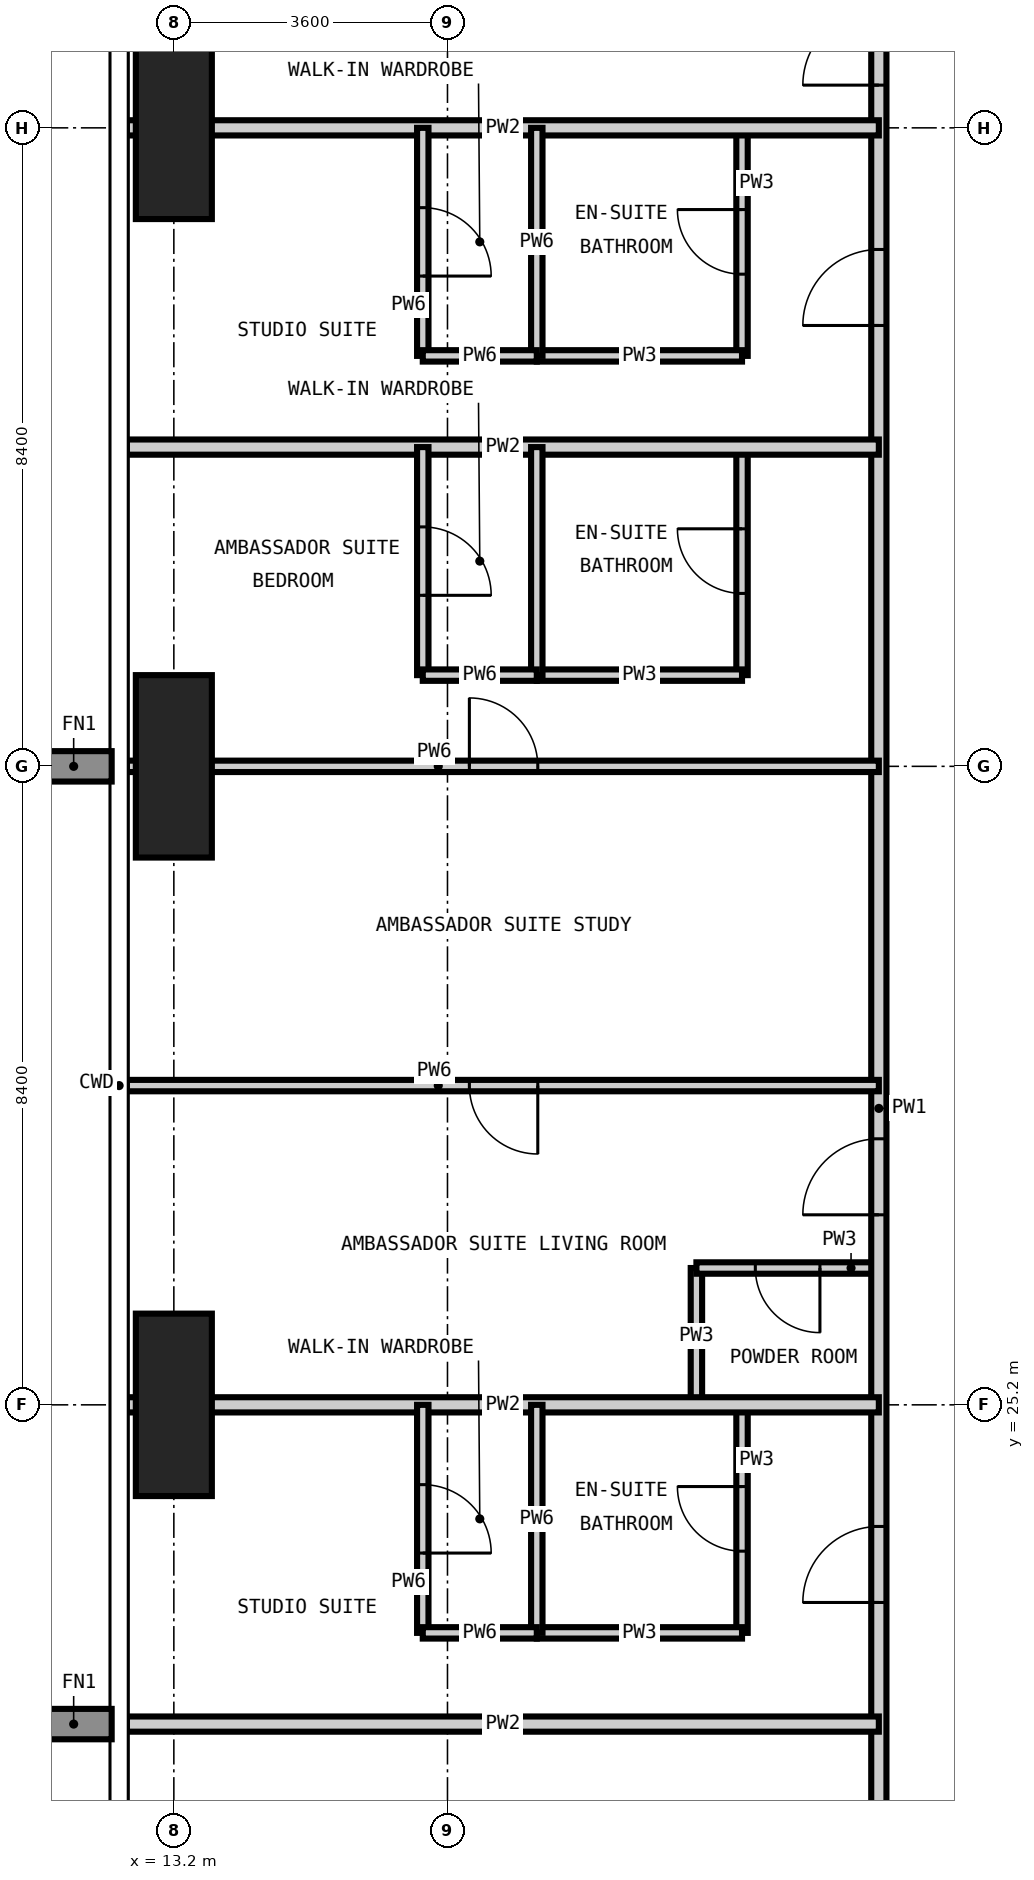
"""IFC4 building model, lengths in metres.
Left out: names, types, materials, properties, quantities, classifications, styles, units other than length and angle.
Written with IfcOpenShell. Run it as: python <this file> out.ifc"""

import sys

from ifc_helpers import new_model, si_unit, direction, frame, frame_2d, origin, origin_2d, place, context, subcontext, project, spatial, rectangle, extrude, element, fill, save


model = new_model("IFC4")
c1 = context("Model", 3, precision=1e-05, world=origin(), true_north=direction((0.0, 1.0)))
c2 = subcontext(c1, "Body", "Model", "MODEL_VIEW")
j1 = project(units=[si_unit("LENGTHUNIT", "METRE"), si_unit("PLANEANGLEUNIT", "RADIAN")], contexts=[c1])
p1 = place(None, origin())
s1 = spatial("IfcSite", under=j1, at=p1, CompositionType="ELEMENT")
p2 = place(p1, origin())
s2 = spatial("IfcBuilding", under=s1, at=p2, CompositionType="ELEMENT")
p3 = place(p2, frame((0.0, 0.0, 264.6)))
s3 = spatial("IfcBuildingStorey", under=s2, at=p3, CompositionType="ELEMENT", Elevation=264.6)
for number, where, z_axis, x_axis in (
    (1, (13.2, 25.2, -0.35), (0.0, 0.0, 1.0), (1.0, 0.0, 0.0)),
    (2, (13.2, 33.6, -0.35), (0.0, 0.0, 1.0), (1.0, 0.0, 0.0)),
    (3, (13.2, 42.0, -0.35), (0.0, 0.0, 1.0), (1.0, 0.0, 0.0)),
):
    element("IfcColumn", number, at=place(p3, frame(where, z_axis=z_axis, x_axis=x_axis)), inside=s3, PredefinedType="COLUMN", context=c2, shape_type="SweptSolid", body=[
        extrude(rectangle(XDim=1.0, YDim=2.4, at=origin_2d()), origin(), (0.0, 0.0, 1.0), 3.9),
    ])
p4 = place(p3, frame((20.075, 25.2, 0.0), z_axis=(0.0, 0.0, 1.0), x_axis=(0.0, 1.0, 0.0)))
e4 = element("IfcWall", 4, at=p4, inside=s3, PredefinedType="PARTITIONING", context=c2, shape_type="SweptSolid", body=[
    extrude(rectangle(XDim=1.8, YDim=0.15, at=frame_2d((0.9, 0.0))), origin(), (0.0, 0.0, 1.0), 3.55),
])
p5 = place(p3, frame((20.675, 22.2, 0.0), z_axis=(0.0, 0.0, 1.0), x_axis=(0.0, 1.0, 0.0)))
e5 = element("IfcWall", 5, at=p5, inside=s3, PredefinedType="PARTITIONING", context=c2, shape_type="SweptSolid", body=[
    extrude(rectangle(XDim=3.0, YDim=0.15, at=frame_2d((1.5, 0.0))), origin(), (0.0, 0.0, 1.0), 3.55),
])
p6 = place(p5, frame((1.075, 0.0, 0.0)))
e6 = element("IfcOpeningElement", 6, at=p6, cuts=e5, PredefinedType="OPENING", context=c2, shape_type="SweptSolid", body=[
    extrude(rectangle(XDim=0.85, YDim=2.1, at=frame_2d((0.425, 1.05))), frame((0.0, 0.085, 0.0), z_axis=(0.0, -1.0, 0.0), x_axis=(1.0, 0.0, 0.0)), (0.0, 0.0, 1.0), 0.17),
])
p7 = place(p3, frame((20.675, 34.8, 0.0), z_axis=(0.0, 0.0, 1.0), x_axis=(0.0, 1.0, 0.0)))
e7 = element("IfcWall", 7, at=p7, inside=s3, PredefinedType="PARTITIONING", context=c2, shape_type="SweptSolid", body=[
    extrude(rectangle(XDim=3.0, YDim=0.15, at=frame_2d((1.5, 0.0))), origin(), (0.0, 0.0, 1.0), 3.55),
])
p8 = place(p7, frame((1.075, 0.0, 0.0)))
e8 = element("IfcOpeningElement", 8, at=p8, cuts=e7, PredefinedType="OPENING", context=c2, shape_type="SweptSolid", body=[
    extrude(rectangle(XDim=0.85, YDim=2.1, at=frame_2d((0.425, 1.05))), frame((0.0, 0.085, 0.0), z_axis=(0.0, -1.0, 0.0), x_axis=(1.0, 0.0, 0.0)), (0.0, 0.0, 1.0), 0.17),
])
p9 = place(p3, frame((20.675, 39.0, 0.0), z_axis=(0.0, 0.0, 1.0), x_axis=(0.0, 1.0, 0.0)))
e9 = element("IfcWall", 9, at=p9, inside=s3, PredefinedType="PARTITIONING", context=c2, shape_type="SweptSolid", body=[
    extrude(rectangle(XDim=3.0, YDim=0.15, at=frame_2d((1.5, 0.0))), origin(), (0.0, 0.0, 1.0), 3.55),
])
p10 = place(p9, frame((1.075, 0.0, 0.0)))
e10 = element("IfcOpeningElement", 10, at=p10, cuts=e9, PredefinedType="OPENING", context=c2, shape_type="SweptSolid", body=[
    extrude(rectangle(XDim=0.85, YDim=2.1, at=frame_2d((0.425, 1.05))), frame((0.0, 0.085, 0.0), z_axis=(0.0, -1.0, 0.0), x_axis=(1.0, 0.0, 0.0)), (0.0, 0.0, 1.0), 0.17),
])
p11 = place(p3, frame((17.975, 22.2, 0.0), z_axis=(0.0, 0.0, 1.0), x_axis=(1.0, 0.0, 0.0)))
e11 = element("IfcWall", 11, at=p11, inside=s3, PredefinedType="PARTITIONING", context=c2, shape_type="SweptSolid", body=[
    extrude(rectangle(XDim=2.7, YDim=0.15, at=frame_2d((1.35, 0.0))), origin(), (0.0, 0.0, 1.0), 3.55),
])
p12 = place(p3, frame((20.075, 27.0, 0.0), z_axis=(0.0, 0.0, 1.0), x_axis=(1.0, 0.0, 0.0)))
e12 = element("IfcWall", 12, at=p12, inside=s3, PredefinedType="PARTITIONING", context=c2, shape_type="SweptSolid", body=[
    extrude(rectangle(XDim=2.4, YDim=0.15, at=frame_2d((1.2, 0.0))), origin(), (0.0, 0.0, 1.0), 3.55),
])
p13 = place(p12, frame((0.775, 0.0, 0.0)))
e13 = element("IfcOpeningElement", 13, at=p13, cuts=e12, PredefinedType="OPENING", context=c2, shape_type="SweptSolid", body=[
    extrude(rectangle(XDim=0.85, YDim=2.1, at=frame_2d((0.425, 1.05))), frame((0.0, 0.085, 0.0), z_axis=(0.0, -1.0, 0.0), x_axis=(1.0, 0.0, 0.0)), (0.0, 0.0, 1.0), 0.17),
])
for number, where, z_axis, x_axis in (
    (14, (17.975, 34.8, 0.0), (0.0, 0.0, 1.0), (1.0, 0.0, 0.0)),
    (15, (17.975, 39.0, 0.0), (0.0, 0.0, 1.0), (1.0, 0.0, 0.0)),
):
    element("IfcWall", number, at=place(p3, frame(where, z_axis=z_axis, x_axis=x_axis)), inside=s3, PredefinedType="PARTITIONING", context=c2, shape_type="SweptSolid", body=[
        extrude(rectangle(XDim=2.7, YDim=0.15, at=frame_2d((1.35, 0.0))), origin(), (0.0, 0.0, 1.0), 3.55),
    ])
p14 = place(p3, frame((22.475, 14.075, 0.0), z_axis=(0.0, 0.0, 1.0), x_axis=(0.0, 1.0, 0.0)))
e16 = element("IfcWall", 16, at=p14, inside=s3, PredefinedType="PARTITIONING", context=c2, shape_type="SweptSolid", body=[
    extrude(rectangle(XDim=30.05, YDim=0.2, at=frame_2d((15.025, 0.0))), origin(), (0.0, 0.0, 1.0), 3.55),
])
p15 = place(p14, frame((4.325, 0.0, 0.0)))
e17 = element("IfcOpeningElement", 17, at=p15, cuts=e16, PredefinedType="OPENING", context=c2, shape_type="SweptSolid", body=[
    extrude(rectangle(XDim=1.0, YDim=2.2, at=frame_2d((0.5, 1.1))), frame((0.0, 0.11, 0.0), z_axis=(0.0, -1.0, 0.0), x_axis=(1.0, 0.0, 0.0)), (0.0, 0.0, 1.0), 0.22),
])
p16 = place(p14, frame((8.525, 0.0, 0.0)))
e18 = element("IfcOpeningElement", 18, at=p16, cuts=e16, PredefinedType="OPENING", context=c2, shape_type="SweptSolid", body=[
    extrude(rectangle(XDim=1.0, YDim=2.2, at=frame_2d((0.5, 1.1))), frame((0.0, 0.11, 0.0), z_axis=(0.0, -1.0, 0.0), x_axis=(1.0, 0.0, 0.0)), (0.0, 0.0, 1.0), 0.22),
])
p17 = place(p14, frame((13.625, 0.0, 0.0)))
e19 = element("IfcOpeningElement", 19, at=p17, cuts=e16, PredefinedType="OPENING", context=c2, shape_type="SweptSolid", body=[
    extrude(rectangle(XDim=1.0, YDim=2.2, at=frame_2d((0.5, 1.1))), frame((0.0, 0.11, 0.0), z_axis=(0.0, -1.0, 0.0), x_axis=(1.0, 0.0, 0.0)), (0.0, 0.0, 1.0), 0.22),
])
p18 = place(p14, frame((25.325, 0.0, 0.0)))
e20 = element("IfcOpeningElement", 20, at=p18, cuts=e16, PredefinedType="OPENING", context=c2, shape_type="SweptSolid", body=[
    extrude(rectangle(XDim=1.0, YDim=2.2, at=frame_2d((0.5, 1.1))), frame((0.0, 0.11, 0.0), z_axis=(0.0, -1.0, 0.0), x_axis=(1.0, 0.0, 0.0)), (0.0, 0.0, 1.0), 0.22),
])
p19 = place(p14, frame((0.863, 0.0, 0.0)))
e21 = element("IfcOpeningElement", 21, at=p19, cuts=e16, PredefinedType="OPENING", context=c2, shape_type="SweptSolid", body=[
    extrude(rectangle(XDim=1.0, YDim=2.2, at=frame_2d((0.5, 1.1))), frame((0.0, 0.11, 0.0), z_axis=(0.0, -1.0, 0.0), x_axis=(1.0, 0.0, 0.0)), (0.0, 0.0, 1.0), 0.22),
])
p20 = place(p14, frame((28.487, 0.0, 0.0)))
e22 = element("IfcOpeningElement", 22, at=p20, cuts=e16, PredefinedType="OPENING", context=c2, shape_type="SweptSolid", body=[
    extrude(rectangle(XDim=1.0, YDim=2.2, at=frame_2d((0.5, 1.1))), frame((0.0, 0.11, 0.0), z_axis=(0.0, -1.0, 0.0), x_axis=(1.0, 0.0, 0.0)), (0.0, 0.0, 1.0), 0.22),
])
for number, where, z_axis, x_axis in (
    (23, (12.582, 21.0, 0.0), (0.0, 0.0, 1.0), (1.0, 0.0, 0.0)),
    (24, (12.582, 25.2, 0.0), (0.0, 0.0, 1.0), (1.0, 0.0, 0.0)),
    (25, (12.582, 37.8, 0.0), (0.0, 0.0, 1.0), (1.0, 0.0, 0.0)),
    (26, (12.582, 42.0, 0.0), (0.0, 0.0, 1.0), (1.0, 0.0, 0.0)),
):
    element("IfcWall", number, at=place(p3, frame(where, z_axis=z_axis, x_axis=x_axis)), inside=s3, PredefinedType="PARTITIONING", context=c2, shape_type="SweptSolid", body=[
        extrude(rectangle(XDim=9.893, YDim=0.2, at=frame_2d((4.947, 0.0))), origin(), (0.0, 0.0, 1.0), 3.55),
    ])
p21 = place(p3, frame((16.475, 22.2, 0.0), z_axis=(0.0, 0.0, 1.0), x_axis=(0.0, 1.0, 0.0)))
e27 = element("IfcWall", 27, at=p21, inside=s3, PredefinedType="PARTITIONING", context=c2, shape_type="SweptSolid", body=[
    extrude(rectangle(XDim=3.0, YDim=0.15, at=frame_2d((1.5, 0.0))), origin(), (0.0, 0.0, 1.0), 3.55),
])
p22 = place(p21, frame((1.05, 0.0, 0.0)))
e28 = element("IfcOpeningElement", 28, at=p22, cuts=e27, PredefinedType="OPENING", context=c2, shape_type="SweptSolid", body=[
    extrude(rectangle(XDim=0.9, YDim=2.1, at=frame_2d((0.45, 1.05))), frame((0.0, 0.085, 0.0), z_axis=(0.0, -1.0, 0.0), x_axis=(1.0, 0.0, 0.0)), (0.0, 0.0, 1.0), 0.17),
])
p23 = place(p3, frame((16.475, 34.8, 0.0), z_axis=(0.0, 0.0, 1.0), x_axis=(0.0, 1.0, 0.0)))
e29 = element("IfcWall", 29, at=p23, inside=s3, PredefinedType="PARTITIONING", context=c2, shape_type="SweptSolid", body=[
    extrude(rectangle(XDim=3.0, YDim=0.15, at=frame_2d((1.5, 0.0))), origin(), (0.0, 0.0, 1.0), 3.55),
])
p24 = place(p23, frame((1.05, 0.0, 0.0)))
e30 = element("IfcOpeningElement", 30, at=p24, cuts=e29, PredefinedType="OPENING", context=c2, shape_type="SweptSolid", body=[
    extrude(rectangle(XDim=0.9, YDim=2.1, at=frame_2d((0.45, 1.05))), frame((0.0, 0.085, 0.0), z_axis=(0.0, -1.0, 0.0), x_axis=(1.0, 0.0, 0.0)), (0.0, 0.0, 1.0), 0.17),
])
p25 = place(p3, frame((16.475, 39.0, 0.0), z_axis=(0.0, 0.0, 1.0), x_axis=(0.0, 1.0, 0.0)))
e31 = element("IfcWall", 31, at=p25, inside=s3, PredefinedType="PARTITIONING", context=c2, shape_type="SweptSolid", body=[
    extrude(rectangle(XDim=3.0, YDim=0.15, at=frame_2d((1.5, 0.0))), origin(), (0.0, 0.0, 1.0), 3.55),
])
p26 = place(p25, frame((1.05, 0.0, 0.0)))
e32 = element("IfcOpeningElement", 32, at=p26, cuts=e31, PredefinedType="OPENING", context=c2, shape_type="SweptSolid", body=[
    extrude(rectangle(XDim=0.9, YDim=2.1, at=frame_2d((0.45, 1.05))), frame((0.0, 0.085, 0.0), z_axis=(0.0, -1.0, 0.0), x_axis=(1.0, 0.0, 0.0)), (0.0, 0.0, 1.0), 0.17),
])
for number, where, z_axis, x_axis in (
    (33, (17.975, 22.2, 0.0), (0.0, 0.0, 1.0), (0.0, 1.0, 0.0)),
    (34, (17.975, 34.8, 0.0), (0.0, 0.0, 1.0), (0.0, 1.0, 0.0)),
    (35, (17.975, 39.0, 0.0), (0.0, 0.0, 1.0), (0.0, 1.0, 0.0)),
):
    element("IfcWall", number, at=place(p3, frame(where, z_axis=z_axis, x_axis=x_axis)), inside=s3, PredefinedType="PARTITIONING", context=c2, shape_type="SweptSolid", body=[
        extrude(rectangle(XDim=3.0, YDim=0.15, at=frame_2d((1.5, 0.0))), origin(), (0.0, 0.0, 1.0), 3.55),
    ])
p27 = place(p3, frame((16.475, 22.2, 0.0), z_axis=(0.0, 0.0, 1.0), x_axis=(1.0, 0.0, 0.0)))
e36 = element("IfcWall", 36, at=p27, inside=s3, PredefinedType="PARTITIONING", context=c2, shape_type="SweptSolid", body=[
    extrude(rectangle(XDim=1.5, YDim=0.15, at=frame_2d((0.75, 0.0))), origin(), (0.0, 0.0, 1.0), 3.55),
])
p28 = place(p3, frame((12.582, 29.4, 0.0), z_axis=(0.0, 0.0, 1.0), x_axis=(1.0, 0.0, 0.0)))
e37 = element("IfcWall", 37, at=p28, inside=s3, PredefinedType="PARTITIONING", context=c2, shape_type="SweptSolid", body=[
    extrude(rectangle(XDim=9.893, YDim=0.15, at=frame_2d((4.947, 0.0))), origin(), (0.0, 0.0, 1.0), 3.55),
])
p29 = place(p28, frame((4.506, 0.0, 0.0)))
e38 = element("IfcOpeningElement", 38, at=p29, cuts=e37, PredefinedType="OPENING", context=c2, shape_type="SweptSolid", body=[
    extrude(rectangle(XDim=0.9, YDim=2.1, at=frame_2d((0.45, 1.05))), frame((0.0, 0.085, 0.0), z_axis=(0.0, -1.0, 0.0), x_axis=(1.0, 0.0, 0.0)), (0.0, 0.0, 1.0), 0.17),
])
p30 = place(p3, frame((12.582, 33.6, 0.0), z_axis=(0.0, 0.0, 1.0), x_axis=(1.0, 0.0, 0.0)))
e39 = element("IfcWall", 39, at=p30, inside=s3, PredefinedType="PARTITIONING", context=c2, shape_type="SweptSolid", body=[
    extrude(rectangle(XDim=9.893, YDim=0.15, at=frame_2d((4.947, 0.0))), origin(), (0.0, 0.0, 1.0), 3.55),
])
p31 = place(p30, frame((4.506, 0.0, 0.0)))
e40 = element("IfcOpeningElement", 40, at=p31, cuts=e39, PredefinedType="OPENING", context=c2, shape_type="SweptSolid", body=[
    extrude(rectangle(XDim=0.9, YDim=2.1, at=frame_2d((0.45, 1.05))), frame((0.0, 0.085, 0.0), z_axis=(0.0, -1.0, 0.0), x_axis=(1.0, 0.0, 0.0)), (0.0, 0.0, 1.0), 0.17),
])
for number, where, z_axis, x_axis in (
    (41, (16.475, 34.8, 0.0), (0.0, 0.0, 1.0), (1.0, 0.0, 0.0)),
    (42, (16.475, 39.0, 0.0), (0.0, 0.0, 1.0), (1.0, 0.0, 0.0)),
):
    element("IfcWall", number, at=place(p3, frame(where, z_axis=z_axis, x_axis=x_axis)), inside=s3, PredefinedType="PARTITIONING", context=c2, shape_type="SweptSolid", body=[
        extrude(rectangle(XDim=1.5, YDim=0.15, at=frame_2d((0.75, 0.0))), origin(), (0.0, 0.0, 1.0), 3.55),
    ])
p32 = place(p16, origin())
e43 = element("IfcDoor", 43, at=p32, inside=s3, OperationType="SINGLE_SWING_LEFT", PredefinedType="DOOR", context=c2, shape_type="SweptSolid", body=[
    extrude(rectangle(XDim=1.0, YDim=2.2, at=frame_2d((0.5, 1.1))), frame((0.0, 0.025, 0.0), z_axis=(0.0, -1.0, 0.0), x_axis=(1.0, 0.0, 0.0)), (0.0, 0.0, 1.0), 0.05),
])
fill(e18, e43)
p33 = place(p6, origin())
e44 = element("IfcDoor", 44, at=p33, inside=s3, OperationType="SINGLE_SWING_RIGHT", PredefinedType="DOOR", context=c2, shape_type="SweptSolid", body=[
    extrude(rectangle(XDim=0.85, YDim=2.1, at=frame_2d((0.425, 1.05))), frame((0.0, 0.025, 0.0), z_axis=(0.0, -1.0, 0.0), x_axis=(1.0, 0.0, 0.0)), (0.0, 0.0, 1.0), 0.05),
])
fill(e6, e44)
p34 = place(p22, frame((0.9, 0.0, 0.0), z_axis=(0.0, 0.0, 1.0), x_axis=(-1.0, 0.0, 0.0)))
e45 = element("IfcDoor", 45, at=p34, inside=s3, OperationType="SINGLE_SWING_RIGHT", PredefinedType="DOOR", context=c2, shape_type="SweptSolid", body=[
    extrude(rectangle(XDim=0.9, YDim=2.1, at=frame_2d((0.45, 1.05))), frame((0.0, 0.025, 0.0), z_axis=(0.0, -1.0, 0.0), x_axis=(1.0, 0.0, 0.0)), (0.0, 0.0, 1.0), 0.05),
])
fill(e28, e45)
p35 = place(p17, origin())
e46 = element("IfcDoor", 46, at=p35, inside=s3, OperationType="SINGLE_SWING_LEFT", PredefinedType="DOOR", context=c2, shape_type="SweptSolid", body=[
    extrude(rectangle(XDim=1.0, YDim=2.2, at=frame_2d((0.5, 1.1))), frame((0.0, 0.025, 0.0), z_axis=(0.0, -1.0, 0.0), x_axis=(1.0, 0.0, 0.0)), (0.0, 0.0, 1.0), 0.05),
])
fill(e19, e46)
p36 = place(p13, frame((0.85, 0.0, 0.0), z_axis=(0.0, 0.0, 1.0), x_axis=(-1.0, 0.0, 0.0)))
e47 = element("IfcDoor", 47, at=p36, inside=s3, OperationType="SINGLE_SWING_LEFT", PredefinedType="DOOR", context=c2, shape_type="SweptSolid", body=[
    extrude(rectangle(XDim=0.85, YDim=2.1, at=frame_2d((0.425, 1.05))), frame((0.0, 0.025, 0.0), z_axis=(0.0, -1.0, 0.0), x_axis=(1.0, 0.0, 0.0)), (0.0, 0.0, 1.0), 0.05),
])
fill(e13, e47)
p37 = place(p29, frame((0.9, 0.0, 0.0), z_axis=(0.0, 0.0, 1.0), x_axis=(-1.0, 0.0, 0.0)))
e48 = element("IfcDoor", 48, at=p37, inside=s3, OperationType="SINGLE_SWING_LEFT", PredefinedType="DOOR", context=c2, shape_type="SweptSolid", body=[
    extrude(rectangle(XDim=0.9, YDim=2.1, at=frame_2d((0.45, 1.05))), frame((0.0, 0.025, 0.0), z_axis=(0.0, -1.0, 0.0), x_axis=(1.0, 0.0, 0.0)), (0.0, 0.0, 1.0), 0.05),
])
fill(e38, e48)
p38 = place(p31, origin())
e49 = element("IfcDoor", 49, at=p38, inside=s3, OperationType="SINGLE_SWING_LEFT", PredefinedType="DOOR", context=c2, shape_type="SweptSolid", body=[
    extrude(rectangle(XDim=0.9, YDim=2.1, at=frame_2d((0.45, 1.05))), frame((0.0, 0.025, 0.0), z_axis=(0.0, -1.0, 0.0), x_axis=(1.0, 0.0, 0.0)), (0.0, 0.0, 1.0), 0.05),
])
fill(e40, e49)
p39 = place(p8, origin())
e50 = element("IfcDoor", 50, at=p39, inside=s3, OperationType="SINGLE_SWING_RIGHT", PredefinedType="DOOR", context=c2, shape_type="SweptSolid", body=[
    extrude(rectangle(XDim=0.85, YDim=2.1, at=frame_2d((0.425, 1.05))), frame((0.0, 0.025, 0.0), z_axis=(0.0, -1.0, 0.0), x_axis=(1.0, 0.0, 0.0)), (0.0, 0.0, 1.0), 0.05),
])
fill(e8, e50)
p40 = place(p24, frame((0.9, 0.0, 0.0), z_axis=(0.0, 0.0, 1.0), x_axis=(-1.0, 0.0, 0.0)))
e51 = element("IfcDoor", 51, at=p40, inside=s3, OperationType="SINGLE_SWING_RIGHT", PredefinedType="DOOR", context=c2, shape_type="SweptSolid", body=[
    extrude(rectangle(XDim=0.9, YDim=2.1, at=frame_2d((0.45, 1.05))), frame((0.0, 0.025, 0.0), z_axis=(0.0, -1.0, 0.0), x_axis=(1.0, 0.0, 0.0)), (0.0, 0.0, 1.0), 0.05),
])
fill(e30, e51)
p41 = place(p18, origin())
e52 = element("IfcDoor", 52, at=p41, inside=s3, OperationType="SINGLE_SWING_LEFT", PredefinedType="DOOR", context=c2, shape_type="SweptSolid", body=[
    extrude(rectangle(XDim=1.0, YDim=2.2, at=frame_2d((0.5, 1.1))), frame((0.0, 0.025, 0.0), z_axis=(0.0, -1.0, 0.0), x_axis=(1.0, 0.0, 0.0)), (0.0, 0.0, 1.0), 0.05),
])
fill(e20, e52)
p42 = place(p10, origin())
e53 = element("IfcDoor", 53, at=p42, inside=s3, OperationType="SINGLE_SWING_RIGHT", PredefinedType="DOOR", context=c2, shape_type="SweptSolid", body=[
    extrude(rectangle(XDim=0.85, YDim=2.1, at=frame_2d((0.425, 1.05))), frame((0.0, 0.025, 0.0), z_axis=(0.0, -1.0, 0.0), x_axis=(1.0, 0.0, 0.0)), (0.0, 0.0, 1.0), 0.05),
])
fill(e10, e53)
p43 = place(p26, frame((0.9, 0.0, 0.0), z_axis=(0.0, 0.0, 1.0), x_axis=(-1.0, 0.0, 0.0)))
e54 = element("IfcDoor", 54, at=p43, inside=s3, OperationType="SINGLE_SWING_RIGHT", PredefinedType="DOOR", context=c2, shape_type="SweptSolid", body=[
    extrude(rectangle(XDim=0.9, YDim=2.1, at=frame_2d((0.45, 1.05))), frame((0.0, 0.025, 0.0), z_axis=(0.0, -1.0, 0.0), x_axis=(1.0, 0.0, 0.0)), (0.0, 0.0, 1.0), 0.05),
])
fill(e32, e54)
p44 = place(p20, origin())
e55 = element("IfcDoor", 55, at=p44, inside=s3, OperationType="SINGLE_SWING_LEFT", PredefinedType="DOOR", context=c2, shape_type="SweptSolid", body=[
    extrude(rectangle(XDim=1.0, YDim=2.2, at=frame_2d((0.5, 1.1))), frame((0.0, 0.025, 0.0), z_axis=(0.0, -1.0, 0.0), x_axis=(1.0, 0.0, 0.0)), (0.0, 0.0, 1.0), 0.05),
])
fill(e22, e55)
save(model, sys.argv[1])
